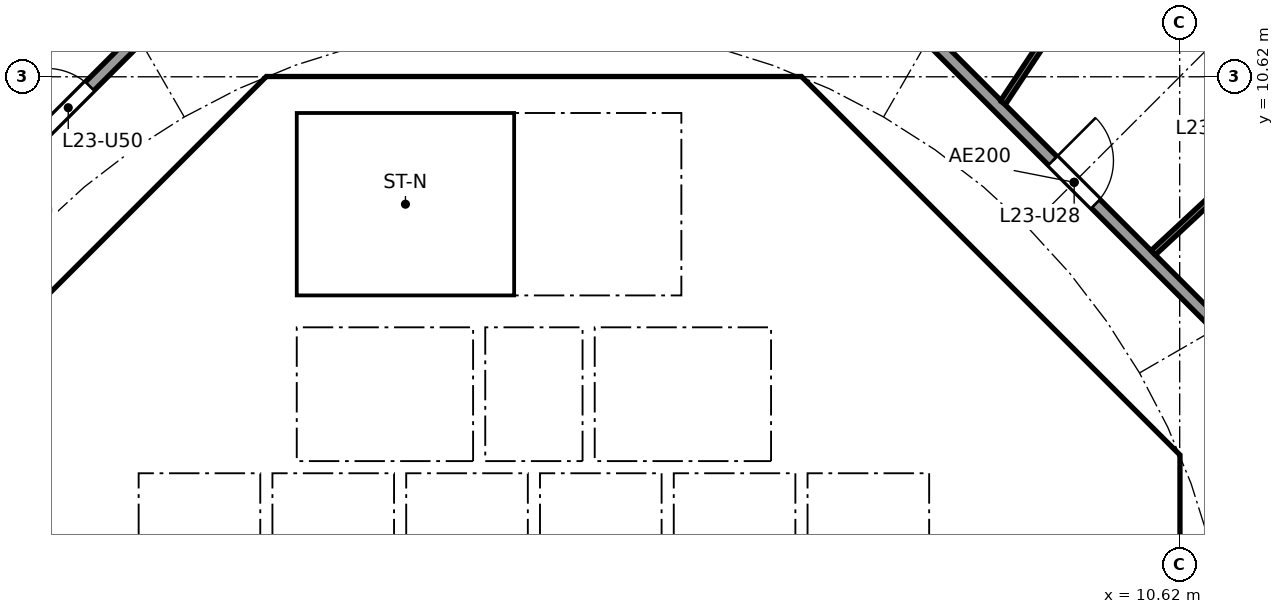
"""IFC4 building model, lengths in metres.
Left out: names, types, materials, properties, quantities, classifications, styles, units other than length and angle.
Written with IfcOpenShell. Run it as: python <this file> out.ifc"""

import sys

from ifc_helpers import new_model, si_unit, direction, frame, frame_2d, origin, place, context, subcontext, project, spatial, polyline, rectangle, outline, extrude, element, fill, save


model = new_model("IFC4")
c1 = context("Model", 3, precision=1e-05, world=origin(), true_north=direction((0.0, 1.0)))
c2 = subcontext(c1, "Body", "Model", "MODEL_VIEW")
j1 = project(units=[si_unit("LENGTHUNIT", "METRE"), si_unit("PLANEANGLEUNIT", "RADIAN")], contexts=[c1])
p1 = place(None, origin())
s1 = spatial("IfcSite", under=j1, at=p1, CompositionType="ELEMENT")
p2 = place(p1, origin())
s2 = spatial("IfcBuilding", under=s1, at=p2, CompositionType="ELEMENT")
p3 = place(p2, frame((0.0, 0.0, 95.5)))
s3 = spatial("IfcBuildingStorey", under=s2, at=p3, CompositionType="ELEMENT", Elevation=95.5)
p4 = place(p3, frame((9.988, 4.613, 0.0), z_axis=(0.0, 0.0, 1.0), x_axis=(-0.707106781187, 0.707106781187, 0.0)))
e1 = element("IfcWall", 1, at=p4, inside=s3, PredefinedType="SHEAR", context=c2, shape_type="SweptSolid", body=[
    extrude(rectangle(XDim=7.602, YDim=0.6, at=frame_2d((3.801, 0.0))), origin(), (0.0, 0.0, 1.0), 3.44),
])
p5 = place(p4, frame((3.201, 0.0, 0.0)))
e2 = element("IfcOpeningElement", 2, at=p5, cuts=e1, PredefinedType="OPENING", context=c2, shape_type="SweptSolid", body=[
    extrude(rectangle(XDim=1.2, YDim=2.1, at=frame_2d((0.6, 1.05))), frame((0.0, 0.31, 0.0), z_axis=(0.0, -1.0, 0.0), x_axis=(1.0, 0.0, 0.0)), (0.0, 0.0, 1.0), 0.62),
])
p6 = place(p3, frame((-4.613, 9.988, 0.0), z_axis=(0.0, 0.0, 1.0), x_axis=(-0.707106781187, -0.707106781187, 0.0)))
e3 = element("IfcWall", 3, at=p6, inside=s3, PredefinedType="SHEAR", context=c2, shape_type="SweptSolid", body=[
    extrude(rectangle(XDim=7.602, YDim=0.6, at=frame_2d((3.801, 0.0))), origin(), (0.0, 0.0, 1.0), 3.44),
])
p7 = place(p6, frame((0.351, 0.0, 0.0)))
e4 = element("IfcOpeningElement", 4, at=p7, cuts=e3, PredefinedType="OPENING", context=c2, shape_type="SweptSolid", body=[
    extrude(rectangle(XDim=1.1, YDim=2.1, at=frame_2d((0.55, 1.05))), frame((0.0, 0.31, 0.0), z_axis=(0.0, -1.0, 0.0), x_axis=(1.0, 0.0, 0.0)), (0.0, 0.0, 1.0), 0.62),
])
p8 = place(p3, frame((-7.0, 4.1, 0.0), z_axis=(0.0, 0.0, 1.0), x_axis=(0.0, 1.0, 0.0)))
e5 = element("IfcWall", 5, at=p8, inside=s3, PredefinedType="PARTITIONING", context=c2, shape_type="SweptSolid", body=[
    extrude(rectangle(XDim=2.927, YDim=0.15, at=frame_2d((1.463, 0.0))), origin(), (0.0, 0.0, 1.0), 3.44),
])
p9 = place(p8, frame((1.051, 0.0, 0.0)))
e6 = element("IfcOpeningElement", 6, at=p9, cuts=e5, PredefinedType="OPENING", context=c2, shape_type="SweptSolid", body=[
    extrude(rectangle(XDim=0.9, YDim=2.1, at=frame_2d((0.45, 1.05))), frame((0.0, 0.085, 0.0), z_axis=(0.0, -1.0, 0.0), x_axis=(1.0, 0.0, 0.0)), (0.0, 0.0, 1.0), 0.17),
])
p10 = place(p3, frame((4.0, 4.3, 0.0), z_axis=(0.0, 0.0, 1.0), x_axis=(0.0, 1.0, 0.0)))
e7 = element("IfcWall", 7, at=p10, inside=s3, PredefinedType="SOLIDWALL", context=c2, shape_type="SweptSolid", body=[
    extrude(rectangle(XDim=2.2, YDim=0.2, at=frame_2d((1.1, 0.0))), origin(), (0.0, 0.0, 1.0), 3.44),
])
p11 = place(p10, frame((0.55, 0.0, 0.0)))
e8 = element("IfcOpeningElement", 8, at=p11, cuts=e7, PredefinedType="OPENING", context=c2, shape_type="SweptSolid", body=[
    extrude(rectangle(XDim=1.1, YDim=2.1, at=frame_2d((0.55, 1.05))), frame((0.0, 0.11, 0.0), z_axis=(0.0, -1.0, 0.0), x_axis=(1.0, 0.0, 0.0)), (0.0, 0.0, 1.0), 0.22),
])
p12 = place(p3, frame((-4.0, 4.3, 0.0), z_axis=(0.0, 0.0, 1.0), x_axis=(0.0, 1.0, 0.0)))
e9 = element("IfcWall", 9, at=p12, inside=s3, PredefinedType="SOLIDWALL", context=c2, shape_type="SweptSolid", body=[
    extrude(rectangle(XDim=2.2, YDim=0.2, at=frame_2d((1.1, 0.0))), origin(), (0.0, 0.0, 1.0), 3.44),
])
p13 = place(p12, frame((0.55, 0.0, 0.0)))
e10 = element("IfcOpeningElement", 10, at=p13, cuts=e9, PredefinedType="OPENING", context=c2, shape_type="SweptSolid", body=[
    extrude(rectangle(XDim=1.1, YDim=2.1, at=frame_2d((0.55, 1.05))), frame((0.0, 0.11, 0.0), z_axis=(0.0, -1.0, 0.0), x_axis=(1.0, 0.0, 0.0)), (0.0, 0.0, 1.0), 0.22),
])
p14 = place(p3, frame((6.7, 4.0, 0.0), z_axis=(0.0, 0.0, 1.0), x_axis=(1.0, 0.0, 0.0)))
e11 = element("IfcWall", 11, at=p14, inside=s3, PredefinedType="SOLIDWALL", context=c2, shape_type="SweptSolid", body=[
    extrude(rectangle(XDim=3.325, YDim=0.2, at=frame_2d((1.662, 0.0))), origin(), (0.0, 0.0, 1.0), 3.44),
])
p15 = place(p14, frame((1.25, 0.0, 0.0)))
e12 = element("IfcOpeningElement", 12, at=p15, cuts=e11, PredefinedType="OPENING", context=c2, shape_type="SweptSolid", body=[
    extrude(rectangle(XDim=1.1, YDim=2.1, at=frame_2d((0.55, 1.05))), frame((0.0, 0.11, 0.0), z_axis=(0.0, -1.0, 0.0), x_axis=(1.0, 0.0, 0.0)), (0.0, 0.0, 1.0), 0.22),
])
p16 = place(p3, frame((4.0, 7.025, 0.0), z_axis=(0.0, 0.0, 1.0), x_axis=(0.0, 1.0, 0.0)))
e13 = element("IfcWall", 13, at=p16, inside=s3, PredefinedType="SOLIDWALL", context=c2, shape_type="SweptSolid", body=[
    extrude(rectangle(XDim=3.0, YDim=0.2, at=frame_2d((1.5, 0.0))), origin(), (0.0, 0.0, 1.0), 3.44),
])
p17 = place(p16, frame((0.925, 0.0, 0.0)))
e14 = element("IfcOpeningElement", 14, at=p17, cuts=e13, PredefinedType="OPENING", context=c2, shape_type="SweptSolid", body=[
    extrude(rectangle(XDim=1.1, YDim=2.1, at=frame_2d((0.55, 1.05))), frame((0.0, 0.11, 0.0), z_axis=(0.0, -1.0, 0.0), x_axis=(1.0, 0.0, 0.0)), (0.0, 0.0, 1.0), 0.22),
])
p18 = place(p3, origin())
e15 = element("IfcWall", 15, at=p18, inside=s3, PredefinedType="SHEAR", context=c2, shape_type="SweptSolid", body=[
    extrude(outline(polyline([(-4.152, 10.025), (-4.401, 9.776), (-4.825, 10.2), (-4.401, 10.625), (4.401, 10.625), (4.825, 10.2), (4.401, 9.776), (4.152, 10.025), (-4.152, 10.025)])), origin(), (0.0, 0.0, 1.0), 3.44),
])
p19 = place(p3, origin())
e16 = element("IfcWall", 16, at=p19, inside=s3, PredefinedType="SHEAR", context=c2, shape_type="SweptSolid", body=[
    extrude(outline(polyline([(9.776, -4.401), (10.025, -4.152), (10.025, -3.801), (10.025, 4.152), (9.776, 4.401), (10.2, 4.825), (10.625, 4.401), (10.625, -4.401), (10.2, -4.825), (9.776, -4.401)])), origin(), (0.0, 0.0, 1.0), 3.44),
])
for number, where, z_axis, x_axis in (
    (17, (-0.9, 4.3, 0.0), (0.0, 0.0, 1.0), (0.0, 1.0, 0.0)),
    (18, (0.9, 4.3, 0.0), (0.0, 0.0, 1.0), (0.0, 1.0, 0.0)),
):
    element("IfcWall", number, at=place(p3, frame(where, z_axis=z_axis, x_axis=x_axis)), inside=s3, PredefinedType="SOLIDWALL", context=c2, shape_type="SweptSolid", body=[
        extrude(rectangle(XDim=2.2, YDim=0.2, at=frame_2d((1.1, 0.0))), origin(), (0.0, 0.0, 1.0), 3.44),
    ])
p20 = place(p3, origin())
e19 = element("IfcWall", 19, at=p20, inside=s3, PredefinedType="SOLIDWALL", context=c2, shape_type="SweptSolid", body=[
    extrude(outline(polyline([(-6.5, 2.1), (-6.7, 2.1), (-6.7, 4.3), (6.7, 4.3), (6.7, 2.1), (6.5, 2.1), (6.5, 4.1), (4.5, 4.1), (4.5, 2.1), (4.3, 2.1), (4.3, 4.1), (2.3, 4.1), (2.3, 2.1), (2.1, 2.1), (2.1, 4.1), (0.1, 4.1), (0.1, 2.1), (-0.1, 2.1), (-0.1, 4.1), (-2.1, 4.1), (-2.1, 2.1), (-2.3, 2.1), (-2.3, 4.1), (-4.3, 4.1), (-4.3, 2.1), (-4.5, 2.1), (-4.5, 4.1), (-6.5, 4.1), (-6.5, 2.1)])), origin(), (0.0, 0.0, 1.0), 3.44),
])
p21 = place(p3, frame((-10.025, 4.0, 0.0), z_axis=(0.0, 0.0, 1.0), x_axis=(1.0, 0.0, 0.0)))
e20 = element("IfcWall", 20, at=p21, inside=s3, PredefinedType="PARTITIONING", context=c2, shape_type="SweptSolid", body=[
    extrude(rectangle(XDim=3.325, YDim=0.2, at=frame_2d((1.662, 0.0))), origin(), (0.0, 0.0, 1.0), 3.44),
])
p22 = place(p3, origin())
e21 = element("IfcWall", 21, at=p22, inside=s3, PredefinedType="SOLIDWALL", context=c2, shape_type="SweptSolid", body=[
    extrude(outline(polyline([(-3.9, 7.025), (-4.1, 7.025), (-4.1, 10.025), (-3.9, 10.025), (-3.9, 7.025)])), origin(), (0.0, 0.0, 1.0), 3.44),
])
p23 = place(p3, origin())
e22 = element("IfcWall", 22, at=p23, inside=s3, PredefinedType="SOLIDWALL", context=c2, shape_type="SweptSolid", body=[
    extrude(outline(polyline([(4.1, 6.5), (-4.1, 6.5), (-4.1, 7.025), (4.1, 7.025), (4.1, 6.5)])), origin(), (0.0, 0.0, 1.0), 3.44),
])
p24 = place(p3, origin())
e23 = element("IfcWall", 23, at=p24, inside=s3, PredefinedType="SOLIDWALL", context=c2, shape_type="SweptSolid", body=[
    extrude(outline(polyline([(7.025, -3.9), (6.7, -3.9), (6.7, 3.9), (7.025, 3.9), (7.025, -3.9)])), origin(), (0.0, 0.0, 1.0), 3.44),
])
p25 = place(p3, frame((12.635, 5.134, 0.0), z_axis=(0.0, 0.0, 1.0), x_axis=(-0.707106781187, 0.707106781187, 0.0)))
e24 = element("IfcWall", 24, at=p25, inside=s3, PredefinedType="PARTITIONING", context=c2, shape_type="SweptSolid", body=[
    extrude(rectangle(XDim=10.609, YDim=0.2, at=frame_2d((5.305, 0.0))), origin(), (0.0, 0.0, 1.0), 3.44),
])
p26 = place(p25, frame((4.804, 0.0, 0.0)))
e25 = element("IfcOpeningElement", 25, at=p26, cuts=e24, PredefinedType="OPENING", context=c2, shape_type="SweptSolid", body=[
    extrude(rectangle(XDim=1.0, YDim=2.1, at=frame_2d((0.5, 1.05))), frame((0.0, 0.11, 0.0), z_axis=(0.0, -1.0, 0.0), x_axis=(1.0, 0.0, 0.0)), (0.0, 0.0, 1.0), 0.22),
])
p27 = place(p3, frame((-5.275, 12.494, 0.0), z_axis=(0.0, 0.0, 1.0), x_axis=(-0.707106781187, -0.707106781187, 0.0)))
e26 = element("IfcWall", 26, at=p27, inside=s3, PredefinedType="PARTITIONING", context=c2, shape_type="SweptSolid", body=[
    extrude(rectangle(XDim=10.209, YDim=0.2, at=frame_2d((5.104, 0.0))), origin(), (0.0, 0.0, 1.0), 3.44),
])
p28 = place(p27, frame((2.87, 0.0, 0.0)))
e27 = element("IfcOpeningElement", 27, at=p28, cuts=e26, PredefinedType="OPENING", context=c2, shape_type="SweptSolid", body=[
    extrude(rectangle(XDim=1.0, YDim=2.1, at=frame_2d((0.5, 1.05))), frame((0.0, 0.11, 0.0), z_axis=(0.0, -1.0, 0.0), x_axis=(1.0, 0.0, 0.0)), (0.0, 0.0, 1.0), 0.22),
])
p29 = place(p3, frame((10.185, 7.726, 0.0), z_axis=(0.0, 0.0, 1.0), x_axis=(0.732598472978, 0.680661059112, 0.0)))
e28 = element("IfcWall", 28, at=p29, inside=s3, PredefinedType="PARTITIONING", context=c2, shape_type="SweptSolid", body=[
    extrude(rectangle(XDim=10.167, YDim=0.1, at=frame_2d((5.084, 0.0))), origin(), (0.0, 0.0, 1.0), 2.687),
])
p30 = place(p29, frame((1.725, 0.0, 0.0)))
e29 = element("IfcOpeningElement", 29, at=p30, cuts=e28, PredefinedType="OPENING", context=c2, shape_type="SweptSolid", body=[
    extrude(rectangle(XDim=0.9, YDim=2.1, at=frame_2d((0.45, 1.05))), frame((0.0, 0.06, 0.0), z_axis=(0.0, -1.0, 0.0), x_axis=(1.0, 0.0, 0.0)), (0.0, 0.0, 1.0), 0.12),
])
p31 = place(p29, frame((6.784, 0.0, 0.0)))
e30 = element("IfcOpeningElement", 30, at=p31, cuts=e28, PredefinedType="OPENING", context=c2, shape_type="SweptSolid", body=[
    extrude(rectangle(XDim=0.9, YDim=2.1, at=frame_2d((0.45, 1.05))), frame((0.0, 0.06, 0.0), z_axis=(0.0, -1.0, 0.0), x_axis=(1.0, 0.0, 0.0)), (0.0, 0.0, 1.0), 0.12),
])
p32 = place(p3, frame((7.713, 10.195, 0.0), z_axis=(0.0, 0.0, 1.0), x_axis=(0.552111071171, 0.833770571015, 0.0)))
e31 = element("IfcWall", 31, at=p32, inside=s3, PredefinedType="PARTITIONING", context=c2, shape_type="SweptSolid", body=[
    extrude(rectangle(XDim=17.208, YDim=0.1, at=frame_2d((8.604, 0.0))), origin(), (0.0, 0.0, 1.0), 2.687),
])
p33 = place(p32, frame((1.976, 0.0, 0.0)))
e32 = element("IfcOpeningElement", 32, at=p33, cuts=e31, PredefinedType="OPENING", context=c2, shape_type="SweptSolid", body=[
    extrude(rectangle(XDim=0.9, YDim=2.1, at=frame_2d((0.45, 1.05))), frame((0.0, 0.06, 0.0), z_axis=(0.0, -1.0, 0.0), x_axis=(1.0, 0.0, 0.0)), (0.0, 0.0, 1.0), 0.12),
])
p34 = place(p32, frame((7.611, 0.0, 0.0)))
e33 = element("IfcOpeningElement", 33, at=p34, cuts=e31, PredefinedType="OPENING", context=c2, shape_type="SweptSolid", body=[
    extrude(rectangle(XDim=0.9, YDim=2.1, at=frame_2d((0.45, 1.05))), frame((0.0, 0.06, 0.0), z_axis=(0.0, -1.0, 0.0), x_axis=(1.0, 0.0, 0.0)), (0.0, 0.0, 1.0), 0.12),
])
p35 = place(p32, frame((13.79, 0.0, 0.0)))
e34 = element("IfcOpeningElement", 34, at=p35, cuts=e31, PredefinedType="OPENING", context=c2, shape_type="SweptSolid", body=[
    extrude(rectangle(XDim=0.9, YDim=2.1, at=frame_2d((0.45, 1.05))), frame((0.0, 0.06, 0.0), z_axis=(0.0, -1.0, 0.0), x_axis=(1.0, 0.0, 0.0)), (0.0, 0.0, 1.0), 0.12),
])
p36 = place(p11, origin())
e35 = element("IfcDoor", 35, at=p36, inside=s3, OperationType="DOUBLE_DOOR_SLIDING", PredefinedType="DOOR", context=c2, shape_type="SweptSolid", body=[
    extrude(rectangle(XDim=1.1, YDim=2.1, at=frame_2d((0.55, 1.05))), frame((0.0, 0.025, 0.0), z_axis=(0.0, -1.0, 0.0), x_axis=(1.0, 0.0, 0.0)), (0.0, 0.0, 1.0), 0.05),
])
fill(e8, e35)
p37 = place(p13, origin())
e36 = element("IfcDoor", 36, at=p37, inside=s3, OperationType="DOUBLE_DOOR_SLIDING", PredefinedType="DOOR", context=c2, shape_type="SweptSolid", body=[
    extrude(rectangle(XDim=1.1, YDim=2.1, at=frame_2d((0.55, 1.05))), frame((0.0, 0.025, 0.0), z_axis=(0.0, -1.0, 0.0), x_axis=(1.0, 0.0, 0.0)), (0.0, 0.0, 1.0), 0.05),
])
fill(e10, e36)
p38 = place(p15, frame((1.1, 0.0, 0.0), x_axis=(-1.0, 0.0, 0.0)))
e37 = element("IfcDoor", 37, at=p38, inside=s3, OperationType="SINGLE_SWING_LEFT", PredefinedType="DOOR", context=c2, shape_type="SweptSolid", body=[
    extrude(rectangle(XDim=1.1, YDim=2.1, at=frame_2d((0.55, 1.05))), frame((0.0, 0.025, 0.0), z_axis=(0.0, -1.0, 0.0), x_axis=(1.0, 0.0, 0.0)), (0.0, 0.0, 1.0), 0.05),
])
fill(e12, e37)
p39 = place(p17, origin())
e38 = element("IfcDoor", 38, at=p39, inside=s3, OperationType="SINGLE_SWING_RIGHT", PredefinedType="DOOR", context=c2, shape_type="SweptSolid", body=[
    extrude(rectangle(XDim=1.1, YDim=2.1, at=frame_2d((0.55, 1.05))), frame((0.0, 0.025, 0.0), z_axis=(0.0, -1.0, 0.0), x_axis=(1.0, 0.0, 0.0)), (0.0, 0.0, 1.0), 0.05),
])
fill(e14, e38)
p40 = place(p9, origin())
e39 = element("IfcDoor", 39, at=p40, inside=s3, OperationType="SINGLE_SWING_LEFT", PredefinedType="DOOR", context=c2, shape_type="SweptSolid", body=[
    extrude(rectangle(XDim=0.9, YDim=2.1, at=frame_2d((0.45, 1.05))), frame((0.0, 0.025, 0.0), z_axis=(0.0, -1.0, 0.0), x_axis=(1.0, 0.0, 0.0)), (0.0, 0.0, 1.0), 0.05),
])
fill(e6, e39)
p41 = place(p5, origin())
e40 = element("IfcDoor", 40, at=p41, inside=s3, OperationType="SINGLE_SWING_RIGHT", PredefinedType="DOOR", context=c2, shape_type="SweptSolid", body=[
    extrude(rectangle(XDim=1.2, YDim=2.1, at=frame_2d((0.6, 1.05))), frame((0.0, 0.025, 0.0), z_axis=(0.0, -1.0, 0.0), x_axis=(1.0, 0.0, 0.0)), (0.0, 0.0, 1.0), 0.05),
])
fill(e2, e40)
p42 = place(p7, origin())
e41 = element("IfcDoor", 41, at=p42, inside=s3, OperationType="SINGLE_SWING_RIGHT", PredefinedType="DOOR", context=c2, shape_type="SweptSolid", body=[
    extrude(rectangle(XDim=1.1, YDim=2.1, at=frame_2d((0.55, 1.05))), frame((0.0, 0.025, 0.0), z_axis=(0.0, -1.0, 0.0), x_axis=(1.0, 0.0, 0.0)), (0.0, 0.0, 1.0), 0.05),
])
fill(e4, e41)
p43 = place(p26, frame((1.0, 0.0, 0.0), x_axis=(-1.0, 0.0, 0.0)))
e42 = element("IfcDoor", 42, at=p43, inside=s3, OperationType="SINGLE_SWING_LEFT", PredefinedType="DOOR", context=c2, shape_type="SweptSolid", body=[
    extrude(rectangle(XDim=1.0, YDim=2.1, at=frame_2d((0.5, 1.05))), frame((0.0, 0.025, 0.0), z_axis=(0.0, -1.0, 0.0), x_axis=(1.0, 0.0, 0.0)), (0.0, 0.0, 1.0), 0.05),
])
fill(e25, e42)
p44 = place(p28, frame((1.0, 0.0, 0.0), x_axis=(-1.0, 0.0, 0.0)))
e43 = element("IfcDoor", 43, at=p44, inside=s3, OperationType="SINGLE_SWING_LEFT", PredefinedType="DOOR", context=c2, shape_type="SweptSolid", body=[
    extrude(rectangle(XDim=1.0, YDim=2.1, at=frame_2d((0.5, 1.05))), frame((0.0, 0.025, 0.0), z_axis=(0.0, -1.0, 0.0), x_axis=(1.0, 0.0, 0.0)), (0.0, 0.0, 1.0), 0.05),
])
fill(e27, e43)
save(model, sys.argv[1])
